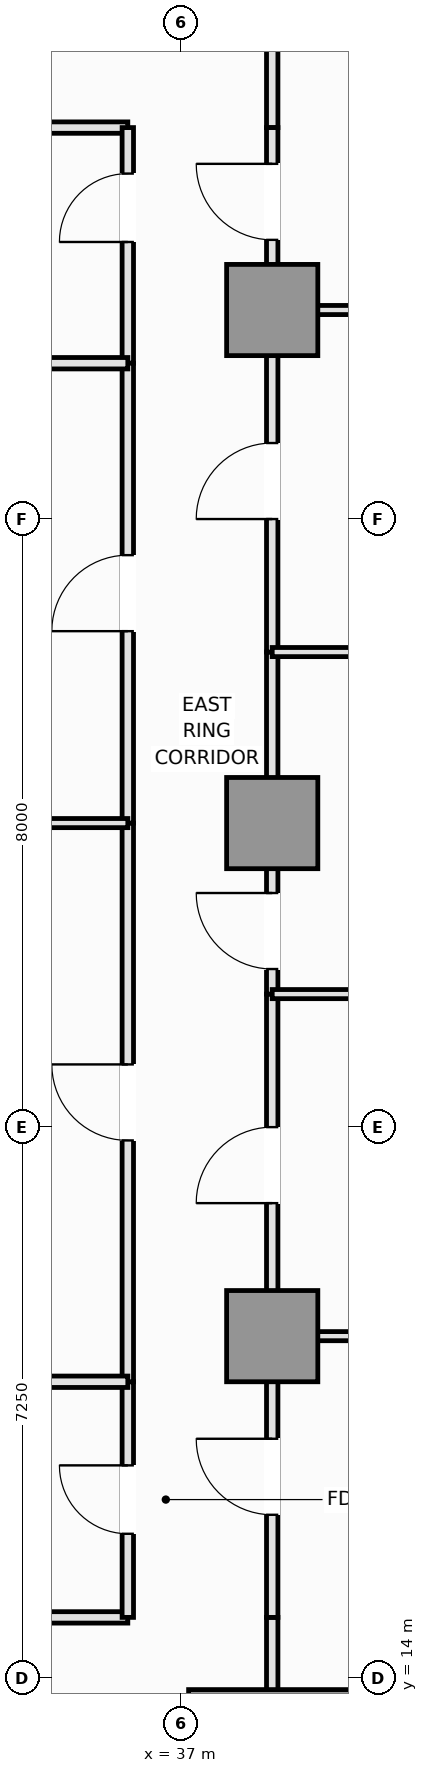
"""IFC4 building model, lengths in metres.
Left out: names, types, materials, properties, quantities, classifications, styles, units other than length and angle.
Written with IfcOpenShell. Run it as: python <this file> out.ifc"""

import sys

from ifc_helpers import new_model, si_unit, direction, frame, frame_2d, origin, origin_2d, place, context, subcontext, project, spatial, rectangle, extrude, element, fill, save


model = new_model("IFC4")
c1 = context("Model", 3, precision=1e-05, world=origin(), true_north=direction((0.0, 1.0)))
c2 = subcontext(c1, "Body", "Model", "MODEL_VIEW")
j1 = project(units=[si_unit("LENGTHUNIT", "METRE"), si_unit("PLANEANGLEUNIT", "RADIAN")], contexts=[c1])
p1 = place(None, origin())
s1 = spatial("IfcSite", under=j1, at=p1, CompositionType="ELEMENT")
p2 = place(p1, origin())
s2 = spatial("IfcBuilding", under=s1, at=p2, CompositionType="ELEMENT")
p3 = place(p2, frame((0.0, 0.0, 78.85)))
s3 = spatial("IfcBuildingStorey", under=s2, at=p3, CompositionType="ELEMENT", Elevation=78.85)
p4 = place(p3, frame((38.2, 12.75, 0.0), z_axis=(0.0, 0.0, 1.0), x_axis=(1.0, 0.0, 0.0)))
e1 = element("IfcColumn", 1, at=p4, inside=s3, PredefinedType="COLUMN", context=c2, shape_type="SweptSolid", body=[
    extrude(rectangle(XDim=2.2, YDim=2.2, at=origin_2d()), origin(), (0.0, 0.0, 1.0), 3.55),
])
for number, where, z_axis, x_axis in (
    (2, (38.2, 18.5, 0.0), (0.0, 0.0, 1.0), (1.0, 0.0, 0.0)),
    (3, (38.2, 25.25, 0.0), (0.0, 0.0, 1.0), (1.0, 0.0, 0.0)),
    (4, (38.2, 32.0, 0.0), (0.0, 0.0, 1.0), (1.0, 0.0, 0.0)),
):
    element("IfcColumn", number, at=place(p3, frame(where, z_axis=z_axis, x_axis=x_axis)), inside=s3, PredefinedType="COLUMN", context=c2, shape_type="SweptSolid", body=[
        extrude(rectangle(XDim=1.2, YDim=1.2, at=origin_2d()), origin(), (0.0, 0.0, 1.0), 3.55),
    ])
p5 = place(p3, frame((33.1, 14.8, 0.0), z_axis=(0.0, 0.0, 1.0), x_axis=(1.0, 0.0, 0.0)))
e5 = element("IfcWall", 5, at=p5, inside=s3, PredefinedType="PLUMBINGWALL", context=c2, shape_type="SweptSolid", body=[
    extrude(rectangle(XDim=3.2, YDim=0.15, at=frame_2d((1.6, 0.0))), origin(), (0.0, 0.0, 1.0), 3.37),
])
p6 = place(p3, frame((38.2, 12.9, 0.0), z_axis=(0.0, 0.0, 1.0), x_axis=(0.0, 1.0, 0.0)))
e6 = element("IfcWall", 6, at=p6, inside=s3, PredefinedType="PARTITIONING", context=c2, shape_type="SweptSolid", body=[
    extrude(rectangle(XDim=1.9, YDim=0.15, at=frame_2d((0.95, 0.0))), origin(), (0.0, 0.0, 1.0), 2.82),
])
p7 = place(p3, frame((33.1, 34.4, 0.0), z_axis=(0.0, 0.0, 1.0), x_axis=(1.0, 0.0, 0.0)))
e7 = element("IfcWall", 7, at=p7, inside=s3, PredefinedType="PLUMBINGWALL", context=c2, shape_type="SweptSolid", body=[
    extrude(rectangle(XDim=3.2, YDim=0.15, at=frame_2d((1.6, 0.0))), origin(), (0.0, 0.0, 1.0), 3.37),
])
p8 = place(p3, frame((38.2, 34.4, 0.0), z_axis=(0.0, 0.0, 1.0), x_axis=(0.0, 1.0, 0.0)))
e8 = element("IfcWall", 8, at=p8, inside=s3, PredefinedType="PARTITIONING", context=c2, shape_type="SweptSolid", body=[
    extrude(rectangle(XDim=1.9, YDim=0.15, at=frame_2d((0.95, 0.0))), origin(), (0.0, 0.0, 1.0), 2.82),
])
p9 = place(p3, frame((36.3, 14.8, 0.0), z_axis=(0.0, 0.0, 1.0), x_axis=(0.0, 1.0, 0.0)))
e9 = element("IfcWall", 9, at=p9, inside=s3, PredefinedType="PLUMBINGWALL", context=c2, shape_type="SweptSolid", body=[
    extrude(rectangle(XDim=3.1, YDim=0.15, at=frame_2d((1.55, 0.0))), origin(), (0.0, 0.0, 1.0), 3.37),
])
p10 = place(p9, frame((1.1, 0.0, 0.0)))
e10 = element("IfcOpeningElement", 10, at=p10, cuts=e9, PredefinedType="OPENING", context=c2, shape_type="SweptSolid", body=[
    extrude(rectangle(XDim=0.9, YDim=2.1, at=frame_2d((0.45, 1.05))), frame((0.0, 0.085, 0.0), z_axis=(0.0, -1.0, 0.0), x_axis=(1.0, 0.0, 0.0)), (0.0, 0.0, 1.0), 0.17),
])
p11 = place(p3, frame((36.3, 31.3, 0.0), z_axis=(0.0, 0.0, 1.0), x_axis=(0.0, 1.0, 0.0)))
e11 = element("IfcWall", 11, at=p11, inside=s3, PredefinedType="PLUMBINGWALL", context=c2, shape_type="SweptSolid", body=[
    extrude(rectangle(XDim=3.1, YDim=0.15, at=frame_2d((1.55, 0.0))), origin(), (0.0, 0.0, 1.0), 3.37),
])
p12 = place(p11, frame((1.595, 0.0, 0.0)))
e12 = element("IfcOpeningElement", 12, at=p12, cuts=e11, PredefinedType="OPENING", context=c2, shape_type="SweptSolid", body=[
    extrude(rectangle(XDim=0.9, YDim=2.1, at=frame_2d((0.45, 1.05))), frame((0.0, 0.085, 0.0), z_axis=(0.0, -1.0, 0.0), x_axis=(1.0, 0.0, 0.0)), (0.0, 0.0, 1.0), 0.17),
])
p13 = place(p3, frame((36.3, 17.9, 0.0), z_axis=(0.0, 0.0, 1.0), x_axis=(0.0, 1.0, 0.0)))
e13 = element("IfcWall", 13, at=p13, inside=s3, PredefinedType="PARTITIONING", context=c2, shape_type="SweptSolid", body=[
    extrude(rectangle(XDim=7.35, YDim=0.15, at=frame_2d((3.675, 0.0))), origin(), (0.0, 0.0, 1.0), 3.37),
])
p14 = place(p13, frame((3.175, 0.0, 0.0)))
e14 = element("IfcOpeningElement", 14, at=p14, cuts=e13, PredefinedType="OPENING", context=c2, shape_type="SweptSolid", body=[
    extrude(rectangle(XDim=1.0, YDim=2.15, at=frame_2d((0.5, 1.075))), frame((0.0, 0.085, 0.0), z_axis=(0.0, -1.0, 0.0), x_axis=(1.0, 0.0, 0.0)), (0.0, 0.0, 1.0), 0.17),
])
p15 = place(p3, frame((36.3, 25.25, 0.0), z_axis=(0.0, 0.0, 1.0), x_axis=(0.0, 1.0, 0.0)))
e15 = element("IfcWall", 15, at=p15, inside=s3, PredefinedType="PARTITIONING", context=c2, shape_type="SweptSolid", body=[
    extrude(rectangle(XDim=6.05, YDim=0.15, at=frame_2d((3.025, 0.0))), origin(), (0.0, 0.0, 1.0), 3.37),
])
p16 = place(p15, frame((2.525, 0.0, 0.0)))
e16 = element("IfcOpeningElement", 16, at=p16, cuts=e15, PredefinedType="OPENING", context=c2, shape_type="SweptSolid", body=[
    extrude(rectangle(XDim=1.0, YDim=2.15, at=frame_2d((0.5, 1.075))), frame((0.0, 0.085, 0.0), z_axis=(0.0, -1.0, 0.0), x_axis=(1.0, 0.0, 0.0)), (0.0, 0.0, 1.0), 0.17),
])
p17 = place(p3, frame((38.2, 14.8, 0.0), z_axis=(0.0, 0.0, 1.0), x_axis=(0.0, 1.0, 0.0)))
e17 = element("IfcWall", 17, at=p17, inside=s3, PredefinedType="PARTITIONING", context=c2, shape_type="SweptSolid", body=[
    extrude(rectangle(XDim=3.7, YDim=0.15, at=frame_2d((1.85, 0.0))), origin(), (0.0, 0.0, 1.0), 2.82),
])
p18 = place(p17, frame((1.35, 0.0, 0.0)))
e18 = element("IfcOpeningElement", 18, at=p18, cuts=e17, PredefinedType="OPENING", context=c2, shape_type="SweptSolid", body=[
    extrude(rectangle(XDim=1.0, YDim=2.15, at=frame_2d((0.5, 1.075))), frame((0.0, 0.085, 0.0), z_axis=(0.0, -1.0, 0.0), x_axis=(1.0, 0.0, 0.0)), (0.0, 0.0, 1.0), 0.17),
])
p19 = place(p3, frame((38.2, 18.5, 0.0), z_axis=(0.0, 0.0, 1.0), x_axis=(0.0, 1.0, 0.0)))
e19 = element("IfcWall", 19, at=p19, inside=s3, PredefinedType="PARTITIONING", context=c2, shape_type="SweptSolid", body=[
    extrude(rectangle(XDim=4.5, YDim=0.15, at=frame_2d((2.25, 0.0))), origin(), (0.0, 0.0, 1.0), 2.82),
])
p20 = place(p19, frame((1.75, 0.0, 0.0)))
e20 = element("IfcOpeningElement", 20, at=p20, cuts=e19, PredefinedType="OPENING", context=c2, shape_type="SweptSolid", body=[
    extrude(rectangle(XDim=1.0, YDim=2.15, at=frame_2d((0.5, 1.075))), frame((0.0, 0.085, 0.0), z_axis=(0.0, -1.0, 0.0), x_axis=(1.0, 0.0, 0.0)), (0.0, 0.0, 1.0), 0.17),
])
p21 = place(p3, frame((38.2, 23.0, 0.0), z_axis=(0.0, 0.0, 1.0), x_axis=(0.0, 1.0, 0.0)))
e21 = element("IfcWall", 21, at=p21, inside=s3, PredefinedType="PARTITIONING", context=c2, shape_type="SweptSolid", body=[
    extrude(rectangle(XDim=4.5, YDim=0.15, at=frame_2d((2.25, 0.0))), origin(), (0.0, 0.0, 1.0), 2.82),
])
p22 = place(p21, frame((0.33, 0.0, 0.0)))
e22 = element("IfcOpeningElement", 22, at=p22, cuts=e21, PredefinedType="OPENING", context=c2, shape_type="SweptSolid", body=[
    extrude(rectangle(XDim=1.0, YDim=2.15, at=frame_2d((0.5, 1.075))), frame((0.0, 0.085, 0.0), z_axis=(0.0, -1.0, 0.0), x_axis=(1.0, 0.0, 0.0)), (0.0, 0.0, 1.0), 0.17),
])
p23 = place(p3, frame((38.2, 27.5, 0.0), z_axis=(0.0, 0.0, 1.0), x_axis=(0.0, 1.0, 0.0)))
e23 = element("IfcWall", 23, at=p23, inside=s3, PredefinedType="PARTITIONING", context=c2, shape_type="SweptSolid", body=[
    extrude(rectangle(XDim=4.5, YDim=0.15, at=frame_2d((2.25, 0.0))), origin(), (0.0, 0.0, 1.0), 2.82),
])
p24 = place(p23, frame((1.75, 0.0, 0.0)))
e24 = element("IfcOpeningElement", 24, at=p24, cuts=e23, PredefinedType="OPENING", context=c2, shape_type="SweptSolid", body=[
    extrude(rectangle(XDim=1.0, YDim=2.15, at=frame_2d((0.5, 1.075))), frame((0.0, 0.085, 0.0), z_axis=(0.0, -1.0, 0.0), x_axis=(1.0, 0.0, 0.0)), (0.0, 0.0, 1.0), 0.17),
])
p25 = place(p3, frame((38.2, 32.0, 0.0), z_axis=(0.0, 0.0, 1.0), x_axis=(0.0, 1.0, 0.0)))
e25 = element("IfcWall", 25, at=p25, inside=s3, PredefinedType="PARTITIONING", context=c2, shape_type="SweptSolid", body=[
    extrude(rectangle(XDim=2.4, YDim=0.15, at=frame_2d((1.2, 0.0))), origin(), (0.0, 0.0, 1.0), 2.82),
])
p26 = place(p25, frame((0.923, 0.0, 0.0)))
e26 = element("IfcOpeningElement", 26, at=p26, cuts=e25, PredefinedType="OPENING", context=c2, shape_type="SweptSolid", body=[
    extrude(rectangle(XDim=1.0, YDim=2.15, at=frame_2d((0.5, 1.075))), frame((0.0, 0.085, 0.0), z_axis=(0.0, -1.0, 0.0), x_axis=(1.0, 0.0, 0.0)), (0.0, 0.0, 1.0), 0.17),
])
for number, where, z_axis, x_axis in (
    (27, (33.1, 17.9, 0.0), (0.0, 0.0, 1.0), (1.0, 0.0, 0.0)),
    (28, (33.1, 31.3, 0.0), (0.0, 0.0, 1.0), (1.0, 0.0, 0.0)),
):
    element("IfcWall", number, at=place(p3, frame(where, z_axis=z_axis, x_axis=x_axis)), inside=s3, PredefinedType="PLUMBINGWALL", context=c2, shape_type="SweptSolid", body=[
        extrude(rectangle(XDim=3.2, YDim=0.15, at=frame_2d((1.6, 0.0))), origin(), (0.0, 0.0, 1.0), 3.37),
    ])
p27 = place(p3, frame((27.5, 25.25, 0.0), z_axis=(0.0, 0.0, 1.0), x_axis=(1.0, 0.0, 0.0)))
e29 = element("IfcWall", 29, at=p27, inside=s3, PredefinedType="PARTITIONING", context=c2, shape_type="SweptSolid", body=[
    extrude(rectangle(XDim=8.8, YDim=0.12, at=frame_2d((4.4, 0.0))), origin(), (0.0, 0.0, 1.0), 2.72),
])
p28 = place(p3, frame((38.2, 18.5, 0.0), z_axis=(0.0, 0.0, 1.0), x_axis=(1.0, 0.0, 0.0)))
e30 = element("IfcWall", 30, at=p28, inside=s3, PredefinedType="PARTITIONING", context=c2, shape_type="SweptSolid", body=[
    extrude(rectangle(XDim=15.29, YDim=0.12, at=frame_2d((7.645, 0.0))), origin(), (0.0, 0.0, 1.0), 2.72),
])
for number, where, z_axis, x_axis in (
    (31, (38.2, 23.0, 0.0), (0.0, 0.0, 1.0), (1.0, 0.0, 0.0)),
    (32, (38.2, 27.5, 0.0), (0.0, 0.0, 1.0), (1.0, 0.0, 0.0)),
):
    element("IfcWall", number, at=place(p3, frame(where, z_axis=z_axis, x_axis=x_axis)), inside=s3, PredefinedType="PARTITIONING", context=c2, shape_type="SweptSolid", body=[
        extrude(rectangle(XDim=15.29, YDim=0.12, at=frame_2d((7.645, 0.0))), origin(), (0.0, 0.0, 1.0), 3.37),
    ])
p29 = place(p3, frame((38.2, 32.0, 0.0), z_axis=(0.0, 0.0, 1.0), x_axis=(1.0, 0.0, 0.0)))
e33 = element("IfcWall", 33, at=p29, inside=s3, PredefinedType="PARTITIONING", context=c2, shape_type="SweptSolid", body=[
    extrude(rectangle(XDim=15.29, YDim=0.12, at=frame_2d((7.645, 0.0))), origin(), (0.0, 0.0, 1.0), 2.72),
])
p30 = place(p10, origin())
e34 = element("IfcDoor", 34, at=p30, inside=s3, OperationType="SINGLE_SWING_RIGHT", PredefinedType="DOOR", context=c2, shape_type="SweptSolid", body=[
    extrude(rectangle(XDim=0.9, YDim=2.1, at=frame_2d((0.45, 1.05))), frame((0.0, 0.025, 0.0), z_axis=(0.0, -1.0, 0.0), x_axis=(1.0, 0.0, 0.0)), (0.0, 0.0, 1.0), 0.05),
])
fill(e10, e34)
p31 = place(p12, origin())
e35 = element("IfcDoor", 35, at=p31, inside=s3, OperationType="SINGLE_SWING_LEFT", PredefinedType="DOOR", context=c2, shape_type="SweptSolid", body=[
    extrude(rectangle(XDim=0.9, YDim=2.1, at=frame_2d((0.45, 1.05))), frame((0.0, 0.025, 0.0), z_axis=(0.0, -1.0, 0.0), x_axis=(1.0, 0.0, 0.0)), (0.0, 0.0, 1.0), 0.05),
])
fill(e12, e35)
p32 = place(p14, origin())
e36 = element("IfcDoor", 36, at=p32, inside=s3, OperationType="SINGLE_SWING_RIGHT", PredefinedType="DOOR", context=c2, shape_type="SweptSolid", body=[
    extrude(rectangle(XDim=1.0, YDim=2.15, at=frame_2d((0.5, 1.075))), frame((0.0, 0.025, 0.0), z_axis=(0.0, -1.0, 0.0), x_axis=(1.0, 0.0, 0.0)), (0.0, 0.0, 1.0), 0.05),
])
fill(e14, e36)
p33 = place(p16, origin())
e37 = element("IfcDoor", 37, at=p33, inside=s3, OperationType="SINGLE_SWING_LEFT", PredefinedType="DOOR", context=c2, shape_type="SweptSolid", body=[
    extrude(rectangle(XDim=1.0, YDim=2.15, at=frame_2d((0.5, 1.075))), frame((0.0, 0.025, 0.0), z_axis=(0.0, -1.0, 0.0), x_axis=(1.0, 0.0, 0.0)), (0.0, 0.0, 1.0), 0.05),
])
fill(e16, e37)
p34 = place(p18, origin())
e38 = element("IfcDoor", 38, at=p34, inside=s3, OperationType="SINGLE_SWING_RIGHT", PredefinedType="DOOR", context=c2, shape_type="SweptSolid", body=[
    extrude(rectangle(XDim=1.0, YDim=2.15, at=frame_2d((0.5, 1.075))), frame((0.0, 0.025, 0.0), z_axis=(0.0, -1.0, 0.0), x_axis=(1.0, 0.0, 0.0)), (0.0, 0.0, 1.0), 0.05),
])
fill(e18, e38)
p35 = place(p20, origin())
e39 = element("IfcDoor", 39, at=p35, inside=s3, OperationType="SINGLE_SWING_LEFT", PredefinedType="DOOR", context=c2, shape_type="SweptSolid", body=[
    extrude(rectangle(XDim=1.0, YDim=2.15, at=frame_2d((0.5, 1.075))), frame((0.0, 0.025, 0.0), z_axis=(0.0, -1.0, 0.0), x_axis=(1.0, 0.0, 0.0)), (0.0, 0.0, 1.0), 0.05),
])
fill(e20, e39)
p36 = place(p22, origin())
e40 = element("IfcDoor", 40, at=p36, inside=s3, OperationType="SINGLE_SWING_RIGHT", PredefinedType="DOOR", context=c2, shape_type="SweptSolid", body=[
    extrude(rectangle(XDim=1.0, YDim=2.15, at=frame_2d((0.5, 1.075))), frame((0.0, 0.025, 0.0), z_axis=(0.0, -1.0, 0.0), x_axis=(1.0, 0.0, 0.0)), (0.0, 0.0, 1.0), 0.05),
])
fill(e22, e40)
p37 = place(p24, origin())
e41 = element("IfcDoor", 41, at=p37, inside=s3, OperationType="SINGLE_SWING_LEFT", PredefinedType="DOOR", context=c2, shape_type="SweptSolid", body=[
    extrude(rectangle(XDim=1.0, YDim=2.15, at=frame_2d((0.5, 1.075))), frame((0.0, 0.025, 0.0), z_axis=(0.0, -1.0, 0.0), x_axis=(1.0, 0.0, 0.0)), (0.0, 0.0, 1.0), 0.05),
])
fill(e24, e41)
p38 = place(p26, origin())
e42 = element("IfcDoor", 42, at=p38, inside=s3, OperationType="SINGLE_SWING_RIGHT", PredefinedType="DOOR", context=c2, shape_type="SweptSolid", body=[
    extrude(rectangle(XDim=1.0, YDim=2.15, at=frame_2d((0.5, 1.075))), frame((0.0, 0.025, 0.0), z_axis=(0.0, -1.0, 0.0), x_axis=(1.0, 0.0, 0.0)), (0.0, 0.0, 1.0), 0.05),
])
fill(e26, e42)
save(model, sys.argv[1])
